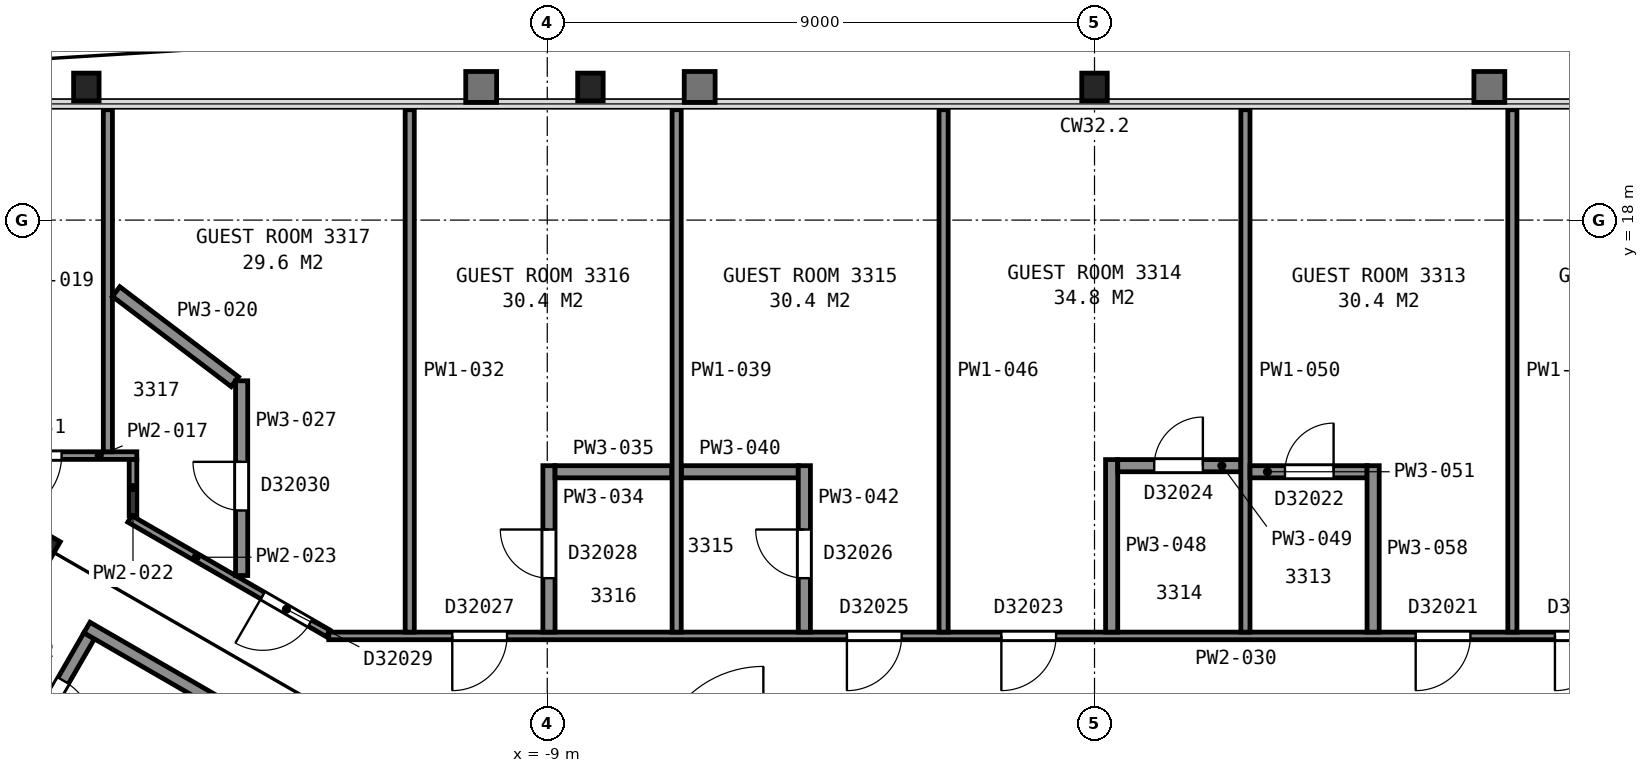
"""IFC4 building model, lengths in metres.
Left out: names, types, materials, properties, quantities, classifications, styles, units other than length and angle.
Written with IfcOpenShell. Run it as: python <this file> out.ifc"""

import sys

from ifc_helpers import new_model, si_unit, direction, frame, frame_2d, origin, origin_2d, place, context, subcontext, project, spatial, rectangle, i_section, extrude, element, fill, save


model = new_model("IFC4")
c1 = context("Model", 3, precision=1e-05, world=origin(), true_north=direction((0.0, 1.0)))
c2 = subcontext(c1, "Body", "Model", "MODEL_VIEW")
j1 = project(units=[si_unit("LENGTHUNIT", "METRE"), si_unit("PLANEANGLEUNIT", "RADIAN")], contexts=[c1])
p1 = place(None, origin())
s1 = spatial("IfcSite", under=j1, at=p1, CompositionType="ELEMENT")
p2 = place(p1, origin())
s2 = spatial("IfcBuilding", under=s1, at=p2, CompositionType="ELEMENT")
p3 = place(p2, frame((0.0, 0.0, 136.0)))
s3 = spatial("IfcBuildingStorey", under=s2, at=p3, CompositionType="ELEMENT", Elevation=136.0)
for number, where, z_axis, x_axis in (
    (1, (0.0, 20.19, 0.0), (0.0, 0.0, 1.0), (1.0, 0.0, 0.0)),
    (2, (-8.29, 20.19, 0.0), (0.0, 0.0, 1.0), (1.0, 0.0, 0.0)),
    (3, (-16.58, 20.19, 0.0), (0.0, 0.0, 1.0), (1.0, 0.0, 0.0)),
):
    element("IfcColumn", number, at=place(p3, frame(where, z_axis=z_axis, x_axis=x_axis)), inside=s3, PredefinedType="COLUMN", context=c2, shape_type="SweptSolid", body=[
        extrude(i_section(OverallWidth=0.419, OverallDepth=0.455, WebThickness=0.042, FlangeThickness=0.068, FilletRadius=0.015, at=origin_2d()), origin(), (0.0, 0.0, 1.0), 3.6),
    ])
p4 = place(p3, frame((-17.3, 12.64, 0.0), z_axis=(0.0, 0.0, 1.0), x_axis=(0.5, 0.866025403784, 0.0)))
e4 = element("IfcColumn", 4, at=p4, inside=s3, PredefinedType="COLUMN", context=c2, shape_type="SweptSolid", body=[
    extrude(i_section(OverallWidth=0.411, OverallDepth=0.434, WebThickness=0.036, FlangeThickness=0.057, FilletRadius=0.015, at=origin_2d()), origin(), (0.0, 0.0, 1.0), 3.6),
])
p5 = place(p3, frame((6.178, 5.299, 0.0), z_axis=(0.0, 0.0, 1.0), x_axis=(0.866026010844, 0.49999894854, 0.0)))
e5 = element("IfcWall", 5, at=p5, inside=s3, PredefinedType="PARTITIONING", context=c2, shape_type="SweptSolid", body=[
    extrude(rectangle(XDim=12.0, YDim=0.2, at=frame_2d((6.0, 0.0))), origin(), (0.0, 0.0, 1.0), 3.35),
])
p6 = place(p3, frame((-16.534, 11.162, 0.0), z_axis=(0.0, 0.0, 1.0), x_axis=(-0.49998411664, -0.866034573852, 0.0)))
e6 = element("IfcWall", 6, at=p6, inside=s3, PredefinedType="PARTITIONING", context=c2, shape_type="SweptSolid", body=[
    extrude(rectangle(XDim=2.8, YDim=0.2, at=frame_2d((1.4, 0.0))), origin(), (0.0, 0.0, 1.0), 3.35),
])
p7 = place(p6, frame((0.85, 0.0, 0.0)))
e7 = element("IfcOpeningElement", 7, at=p7, cuts=e6, PredefinedType="OPENING", context=c2, shape_type="SweptSolid", body=[
    extrude(rectangle(XDim=1.1, YDim=2.1, at=frame_2d((0.55, 1.05))), frame((0.0, 0.11, 0.0), z_axis=(0.0, -1.0, 0.0), x_axis=(1.0, 0.0, 0.0)), (0.0, 0.0, 1.0), 0.22),
])
p8 = place(p3, frame((-6.178, 5.299, 0.0), z_axis=(0.0, 0.0, 1.0), x_axis=(-0.866026010844, 0.49999894854, 0.0)))
e8 = element("IfcWall", 8, at=p8, inside=s3, PredefinedType="PARTITIONING", context=c2, shape_type="SweptSolid", body=[
    extrude(rectangle(XDim=12.0, YDim=0.2, at=frame_2d((6.0, 0.0))), origin(), (0.0, 0.0, 1.0), 3.35),
])
p9 = place(p3, frame((-18.85, 14.127, 0.0), z_axis=(0.0, 0.0, 1.0), x_axis=(1.0, 0.0, 0.0)))
e9 = element("IfcWall", 9, at=p9, inside=s3, PredefinedType="PARTITIONING", context=c2, shape_type="SweptSolid", body=[
    extrude(rectangle(XDim=3.099, YDim=0.125, at=frame_2d((1.55, 0.0))), origin(), (0.0, 0.0, 1.0), 2.613),
])
p10 = place(p9, frame((0.863, 0.0, 0.0)))
e10 = element("IfcOpeningElement", 10, at=p10, cuts=e9, PredefinedType="OPENING", context=c2, shape_type="SweptSolid", body=[
    extrude(rectangle(XDim=1.0, YDim=2.1, at=frame_2d((0.5, 1.05))), frame((0.0, 0.073, 0.0), z_axis=(0.0, -1.0, 0.0), x_axis=(1.0, 0.0, 0.0)), (0.0, 0.0, 1.0), 0.145),
])
p11 = place(p3, frame((-16.226, 14.189, 0.0), z_axis=(0.0, 0.0, 1.0), x_axis=(0.0, 1.0, 0.0)))
e11 = element("IfcWall", 11, at=p11, inside=s3, PredefinedType="PARTITIONING", context=c2, shape_type="SweptSolid", body=[
    extrude(rectangle(XDim=5.625, YDim=0.15, at=frame_2d((2.813, 0.0))), origin(), (0.0, 0.0, 1.0), 2.613),
])
p12 = place(p3, frame((-16.091, 16.824, 0.0), z_axis=(0.0, 0.0, 1.0), x_axis=(0.796497816393, -0.604641404869, 0.0)))
e12 = element("IfcWall", 12, at=p12, inside=s3, PredefinedType="PARTITIONING", context=c2, shape_type="SweptSolid", body=[
    extrude(rectangle(XDim=2.452, YDim=0.2, at=frame_2d((1.226, 0.0))), origin(), (0.0, 0.0, 1.0), 2.613),
])
p13 = place(p3, frame((-15.813, 13.14, 0.0), z_axis=(0.0, 0.0, 1.0), x_axis=(0.0, 1.0, 0.0)))
e13 = element("IfcWall", 13, at=p13, inside=s3, PredefinedType="PARTITIONING", context=c2, shape_type="SweptSolid", body=[
    extrude(rectangle(XDim=0.922, YDim=0.125, at=frame_2d((0.461, 0.0))), origin(), (0.0, 0.0, 1.0), 2.613),
])
p14 = place(p3, frame((-15.867, 13.086, 0.0), z_axis=(0.0, 0.0, 1.0), x_axis=(0.866113281362, -0.499847760672, 0.0)))
e14 = element("IfcWall", 14, at=p14, inside=s3, PredefinedType="PARTITIONING", context=c2, shape_type="SweptSolid", body=[
    extrude(rectangle(XDim=3.767, YDim=0.125, at=frame_2d((1.883, 0.0))), origin(), (0.0, 0.0, 1.0), 2.613),
])
p15 = place(p14, frame((2.525, 0.0, 0.0)))
e15 = element("IfcOpeningElement", 15, at=p15, cuts=e14, PredefinedType="OPENING", context=c2, shape_type="SweptSolid", body=[
    extrude(rectangle(XDim=0.9, YDim=2.1, at=frame_2d((0.45, 1.05))), frame((0.0, 0.073, 0.0), z_axis=(0.0, -1.0, 0.0), x_axis=(1.0, 0.0, 0.0)), (0.0, 0.0, 1.0), 0.145),
])
p16 = place(p3, frame((-14.026, 12.154, 0.0), z_axis=(0.0, 0.0, 1.0), x_axis=(0.0, 1.0, 0.0)))
e16 = element("IfcWall", 16, at=p16, inside=s3, PredefinedType="PARTITIONING", context=c2, shape_type="SweptSolid", body=[
    extrude(rectangle(XDim=3.203, YDim=0.2, at=frame_2d((1.602, 0.0))), origin(), (0.0, 0.0, 1.0), 2.613),
])
p17 = place(p16, frame((1.07, 0.0, 0.0)))
e17 = element("IfcOpeningElement", 17, at=p17, cuts=e16, PredefinedType="OPENING", context=c2, shape_type="SweptSolid", body=[
    extrude(rectangle(XDim=0.8, YDim=2.1, at=frame_2d((0.4, 1.05))), frame((0.0, 0.11, 0.0), z_axis=(0.0, -1.0, 0.0), x_axis=(1.0, 0.0, 0.0)), (0.0, 0.0, 1.0), 0.22),
])
p18 = place(p3, frame((-12.594, 11.161, 0.0), z_axis=(0.0, 0.0, 1.0), x_axis=(1.0, 0.0, 0.0)))
e18 = element("IfcWall", 18, at=p18, inside=s3, PredefinedType="PARTITIONING", context=c2, shape_type="SweptSolid", body=[
    extrude(rectangle(XDim=25.187, YDim=0.125, at=frame_2d((12.594, 0.0))), origin(), (0.0, 0.0, 1.0), 2.613),
])
p19 = place(p18, frame((20.166, 0.0, 0.0)))
e19 = element("IfcOpeningElement", 19, at=p19, cuts=e18, PredefinedType="OPENING", context=c2, shape_type="SweptSolid", body=[
    extrude(rectangle(XDim=0.9, YDim=2.1, at=frame_2d((0.45, 1.05))), frame((0.0, 0.073, 0.0), z_axis=(0.0, -1.0, 0.0), x_axis=(1.0, 0.0, 0.0)), (0.0, 0.0, 1.0), 0.145),
])
p20 = place(p18, frame((17.875, 0.0, 0.0)))
e20 = element("IfcOpeningElement", 20, at=p20, cuts=e18, PredefinedType="OPENING", context=c2, shape_type="SweptSolid", body=[
    extrude(rectangle(XDim=0.9, YDim=2.1, at=frame_2d((0.45, 1.05))), frame((0.0, 0.073, 0.0), z_axis=(0.0, -1.0, 0.0), x_axis=(1.0, 0.0, 0.0)), (0.0, 0.0, 1.0), 0.145),
])
p21 = place(p18, frame((11.062, 0.0, 0.0)))
e21 = element("IfcOpeningElement", 21, at=p21, cuts=e18, PredefinedType="OPENING", context=c2, shape_type="SweptSolid", body=[
    extrude(rectangle(XDim=0.9, YDim=2.1, at=frame_2d((0.45, 1.05))), frame((0.0, 0.073, 0.0), z_axis=(0.0, -1.0, 0.0), x_axis=(1.0, 0.0, 0.0)), (0.0, 0.0, 1.0), 0.145),
])
p22 = place(p18, frame((8.521, 0.0, 0.0)))
e22 = element("IfcOpeningElement", 22, at=p22, cuts=e18, PredefinedType="OPENING", context=c2, shape_type="SweptSolid", body=[
    extrude(rectangle(XDim=0.9, YDim=2.1, at=frame_2d((0.45, 1.05))), frame((0.0, 0.073, 0.0), z_axis=(0.0, -1.0, 0.0), x_axis=(1.0, 0.0, 0.0)), (0.0, 0.0, 1.0), 0.145),
])
p23 = place(p18, frame((2.031, 0.0, 0.0)))
e23 = element("IfcOpeningElement", 23, at=p23, cuts=e18, PredefinedType="OPENING", context=c2, shape_type="SweptSolid", body=[
    extrude(rectangle(XDim=0.9, YDim=2.1, at=frame_2d((0.45, 1.05))), frame((0.0, 0.073, 0.0), z_axis=(0.0, -1.0, 0.0), x_axis=(1.0, 0.0, 0.0)), (0.0, 0.0, 1.0), 0.145),
])
p24 = place(p3, frame((-11.262, 11.223, 0.0), z_axis=(0.0, 0.0, 1.0), x_axis=(0.0, 1.0, 0.0)))
e24 = element("IfcWall", 24, at=p24, inside=s3, PredefinedType="PARTITIONING", context=c2, shape_type="SweptSolid", body=[
    extrude(rectangle(XDim=8.592, YDim=0.15, at=frame_2d((4.296, 0.0))), origin(), (0.0, 0.0, 1.0), 2.613),
])
p25 = place(p3, frame((-8.972, 13.961, 0.0), z_axis=(0.0, 0.0, 1.0), x_axis=(0.0, -1.0, 0.0)))
e25 = element("IfcWall", 25, at=p25, inside=s3, PredefinedType="PARTITIONING", context=c2, shape_type="SweptSolid", body=[
    extrude(rectangle(XDim=2.738, YDim=0.2, at=frame_2d((1.369, 0.0))), origin(), (0.0, 0.0, 1.0), 2.613),
])
p26 = place(p25, frame((1.05, 0.0, 0.0)))
e26 = element("IfcOpeningElement", 26, at=p26, cuts=e25, PredefinedType="OPENING", context=c2, shape_type="SweptSolid", body=[
    extrude(rectangle(XDim=0.8, YDim=2.1, at=frame_2d((0.4, 1.05))), frame((0.0, 0.11, 0.0), z_axis=(0.0, -1.0, 0.0), x_axis=(1.0, 0.0, 0.0)), (0.0, 0.0, 1.0), 0.22),
])
p27 = place(p3, frame((-8.872, 13.861, 0.0), z_axis=(0.0, 0.0, 1.0), x_axis=(1.0, 0.0, 0.0)))
e27 = element("IfcWall", 27, at=p27, inside=s3, PredefinedType="PARTITIONING", context=c2, shape_type="SweptSolid", body=[
    extrude(rectangle(XDim=1.92, YDim=0.2, at=frame_2d((0.96, 0.0))), origin(), (0.0, 0.0, 1.0), 2.613),
])
p28 = place(p3, frame((-6.872, 11.223, 0.0), z_axis=(0.0, 0.0, 1.0), x_axis=(0.0, 1.0, 0.0)))
e28 = element("IfcWall", 28, at=p28, inside=s3, PredefinedType="PARTITIONING", context=c2, shape_type="SweptSolid", body=[
    extrude(rectangle(XDim=8.592, YDim=0.15, at=frame_2d((4.296, 0.0))), origin(), (0.0, 0.0, 1.0), 2.613),
])
p29 = place(p3, frame((-6.792, 13.861, 0.0), z_axis=(0.0, 0.0, 1.0), x_axis=(1.0, 0.0, 0.0)))
e29 = element("IfcWall", 29, at=p29, inside=s3, PredefinedType="PARTITIONING", context=c2, shape_type="SweptSolid", body=[
    extrude(rectangle(XDim=1.92, YDim=0.2, at=frame_2d((0.96, 0.0))), origin(), (0.0, 0.0, 1.0), 2.613),
])
p30 = place(p3, frame((-4.772, 11.223, 0.0), z_axis=(0.0, 0.0, 1.0), x_axis=(0.0, 1.0, 0.0)))
e30 = element("IfcWall", 30, at=p30, inside=s3, PredefinedType="PARTITIONING", context=c2, shape_type="SweptSolid", body=[
    extrude(rectangle(XDim=2.738, YDim=0.2, at=frame_2d((1.369, 0.0))), origin(), (0.0, 0.0, 1.0), 2.613),
])
p31 = place(p30, frame((0.887, 0.0, 0.0)))
e31 = element("IfcOpeningElement", 31, at=p31, cuts=e30, PredefinedType="OPENING", context=c2, shape_type="SweptSolid", body=[
    extrude(rectangle(XDim=0.8, YDim=2.1, at=frame_2d((0.4, 1.05))), frame((0.0, 0.11, 0.0), z_axis=(0.0, -1.0, 0.0), x_axis=(1.0, 0.0, 0.0)), (0.0, 0.0, 1.0), 0.22),
])
p32 = place(p3, frame((-2.482, 11.223, 0.0), z_axis=(0.0, 0.0, 1.0), x_axis=(0.0, 1.0, 0.0)))
e32 = element("IfcWall", 32, at=p32, inside=s3, PredefinedType="PARTITIONING", context=c2, shape_type="SweptSolid", body=[
    extrude(rectangle(XDim=8.592, YDim=0.15, at=frame_2d((4.296, 0.0))), origin(), (0.0, 0.0, 1.0), 2.613),
])
p33 = place(p3, frame((0.282, 11.223, 0.0), z_axis=(0.0, 0.0, 1.0), x_axis=(0.0, 1.0, 0.0)))
e33 = element("IfcWall", 33, at=p33, inside=s3, PredefinedType="PARTITIONING", context=c2, shape_type="SweptSolid", body=[
    extrude(rectangle(XDim=2.838, YDim=0.2, at=frame_2d((1.419, 0.0))), origin(), (0.0, 0.0, 1.0), 2.613),
])
p34 = place(p3, frame((2.407, 13.961, 0.0), z_axis=(0.0, 0.0, 1.0), x_axis=(-1.0, 0.0, 0.0)))
e34 = element("IfcWall", 34, at=p34, inside=s3, PredefinedType="PARTITIONING", context=c2, shape_type="SweptSolid", body=[
    extrude(rectangle(XDim=2.025, YDim=0.2, at=frame_2d((1.012, 0.0))), origin(), (0.0, 0.0, 1.0), 2.613),
])
p35 = place(p34, frame((0.625, 0.0, 0.0)))
e35 = element("IfcOpeningElement", 35, at=p35, cuts=e34, PredefinedType="OPENING", context=c2, shape_type="SweptSolid", body=[
    extrude(rectangle(XDim=0.8, YDim=2.1, at=frame_2d((0.4, 1.05))), frame((0.0, 0.11, 0.0), z_axis=(0.0, -1.0, 0.0), x_axis=(1.0, 0.0, 0.0)), (0.0, 0.0, 1.0), 0.22),
])
p36 = place(p3, frame((2.482, 11.223, 0.0), z_axis=(0.0, 0.0, 1.0), x_axis=(0.0, 1.0, 0.0)))
e36 = element("IfcWall", 36, at=p36, inside=s3, PredefinedType="PARTITIONING", context=c2, shape_type="SweptSolid", body=[
    extrude(rectangle(XDim=8.592, YDim=0.15, at=frame_2d((4.296, 0.0))), origin(), (0.0, 0.0, 1.0), 2.613),
])
p37 = place(p3, frame((4.482, 13.861, 0.0), z_axis=(0.0, 0.0, 1.0), x_axis=(-1.0, 0.0, 0.0)))
e37 = element("IfcWall", 37, at=p37, inside=s3, PredefinedType="PARTITIONING", context=c2, shape_type="SweptSolid", body=[
    extrude(rectangle(XDim=1.925, YDim=0.2, at=frame_2d((0.962, 0.0))), origin(), (0.0, 0.0, 1.0), 2.613),
])
p38 = place(p37, frame((0.55, 0.0, 0.0)))
e38 = element("IfcOpeningElement", 38, at=p38, cuts=e37, PredefinedType="OPENING", context=c2, shape_type="SweptSolid", body=[
    extrude(rectangle(XDim=0.8, YDim=2.1, at=frame_2d((0.4, 1.05))), frame((0.0, 0.11, 0.0), z_axis=(0.0, -1.0, 0.0), x_axis=(1.0, 0.0, 0.0)), (0.0, 0.0, 1.0), 0.22),
])
p39 = place(p3, frame((4.582, 11.223, 0.0), z_axis=(0.0, 0.0, 1.0), x_axis=(0.0, 1.0, 0.0)))
e39 = element("IfcWall", 39, at=p39, inside=s3, PredefinedType="PARTITIONING", context=c2, shape_type="SweptSolid", body=[
    extrude(rectangle(XDim=2.738, YDim=0.2, at=frame_2d((1.369, 0.0))), origin(), (0.0, 0.0, 1.0), 2.613),
])
p40 = place(p3, frame((6.872, 11.223, 0.0), z_axis=(0.0, 0.0, 1.0), x_axis=(0.0, 1.0, 0.0)))
e40 = element("IfcWall", 40, at=p40, inside=s3, PredefinedType="PARTITIONING", context=c2, shape_type="SweptSolid", body=[
    extrude(rectangle(XDim=8.592, YDim=0.15, at=frame_2d((4.296, 0.0))), origin(), (0.0, 0.0, 1.0), 2.613),
])
p41 = place(p7, origin())
e41 = element("IfcDoor", 41, at=p41, inside=s3, OperationType="SINGLE_SWING_RIGHT", PredefinedType="DOOR", context=c2, shape_type="SweptSolid", body=[
    extrude(rectangle(XDim=1.1, YDim=2.1, at=frame_2d((0.55, 1.05))), frame((0.0, 0.025, 0.0), z_axis=(0.0, -1.0, 0.0), x_axis=(1.0, 0.0, 0.0)), (0.0, 0.0, 1.0), 0.05),
])
fill(e7, e41)
p42 = place(p10, origin())
e42 = element("IfcDoor", 42, at=p42, inside=s3, OperationType="SINGLE_SWING_LEFT", PredefinedType="DOOR", context=c2, shape_type="SweptSolid", body=[
    extrude(rectangle(XDim=1.0, YDim=2.1, at=frame_2d((0.5, 1.05))), frame((0.0, 0.025, 0.0), z_axis=(0.0, -1.0, 0.0), x_axis=(1.0, 0.0, 0.0)), (0.0, 0.0, 1.0), 0.05),
])
fill(e10, e42)
p43 = place(p15, origin())
e43 = element("IfcDoor", 43, at=p43, inside=s3, OperationType="SINGLE_SWING_LEFT", PredefinedType="DOOR", context=c2, shape_type="SweptSolid", body=[
    extrude(rectangle(XDim=0.9, YDim=2.1, at=frame_2d((0.45, 1.05))), frame((0.0, 0.025, 0.0), z_axis=(0.0, -1.0, 0.0), x_axis=(1.0, 0.0, 0.0)), (0.0, 0.0, 1.0), 0.05),
])
fill(e15, e43)
p44 = place(p17, origin())
e44 = element("IfcDoor", 44, at=p44, inside=s3, OperationType="SINGLE_SWING_RIGHT", PredefinedType="DOOR", context=c2, shape_type="SweptSolid", body=[
    extrude(rectangle(XDim=0.8, YDim=2.1, at=frame_2d((0.4, 1.05))), frame((0.0, 0.025, 0.0), z_axis=(0.0, -1.0, 0.0), x_axis=(1.0, 0.0, 0.0)), (0.0, 0.0, 1.0), 0.05),
])
fill(e17, e44)
p45 = place(p19, origin())
e45 = element("IfcDoor", 45, at=p45, inside=s3, OperationType="SINGLE_SWING_LEFT", PredefinedType="DOOR", context=c2, shape_type="SweptSolid", body=[
    extrude(rectangle(XDim=0.9, YDim=2.1, at=frame_2d((0.45, 1.05))), frame((0.0, 0.025, 0.0), z_axis=(0.0, -1.0, 0.0), x_axis=(1.0, 0.0, 0.0)), (0.0, 0.0, 1.0), 0.05),
])
fill(e19, e45)
p46 = place(p20, origin())
e46 = element("IfcDoor", 46, at=p46, inside=s3, OperationType="SINGLE_SWING_LEFT", PredefinedType="DOOR", context=c2, shape_type="SweptSolid", body=[
    extrude(rectangle(XDim=0.9, YDim=2.1, at=frame_2d((0.45, 1.05))), frame((0.0, 0.025, 0.0), z_axis=(0.0, -1.0, 0.0), x_axis=(1.0, 0.0, 0.0)), (0.0, 0.0, 1.0), 0.05),
])
fill(e20, e46)
p47 = place(p21, origin())
e47 = element("IfcDoor", 47, at=p47, inside=s3, OperationType="SINGLE_SWING_LEFT", PredefinedType="DOOR", context=c2, shape_type="SweptSolid", body=[
    extrude(rectangle(XDim=0.9, YDim=2.1, at=frame_2d((0.45, 1.05))), frame((0.0, 0.025, 0.0), z_axis=(0.0, -1.0, 0.0), x_axis=(1.0, 0.0, 0.0)), (0.0, 0.0, 1.0), 0.05),
])
fill(e21, e47)
p48 = place(p22, origin())
e48 = element("IfcDoor", 48, at=p48, inside=s3, OperationType="SINGLE_SWING_LEFT", PredefinedType="DOOR", context=c2, shape_type="SweptSolid", body=[
    extrude(rectangle(XDim=0.9, YDim=2.1, at=frame_2d((0.45, 1.05))), frame((0.0, 0.025, 0.0), z_axis=(0.0, -1.0, 0.0), x_axis=(1.0, 0.0, 0.0)), (0.0, 0.0, 1.0), 0.05),
])
fill(e22, e48)
p49 = place(p23, origin())
e49 = element("IfcDoor", 49, at=p49, inside=s3, OperationType="SINGLE_SWING_LEFT", PredefinedType="DOOR", context=c2, shape_type="SweptSolid", body=[
    extrude(rectangle(XDim=0.9, YDim=2.1, at=frame_2d((0.45, 1.05))), frame((0.0, 0.025, 0.0), z_axis=(0.0, -1.0, 0.0), x_axis=(1.0, 0.0, 0.0)), (0.0, 0.0, 1.0), 0.05),
])
fill(e23, e49)
p50 = place(p26, origin())
e50 = element("IfcDoor", 50, at=p50, inside=s3, OperationType="SINGLE_SWING_LEFT", PredefinedType="DOOR", context=c2, shape_type="SweptSolid", body=[
    extrude(rectangle(XDim=0.8, YDim=2.1, at=frame_2d((0.4, 1.05))), frame((0.0, 0.025, 0.0), z_axis=(0.0, -1.0, 0.0), x_axis=(1.0, 0.0, 0.0)), (0.0, 0.0, 1.0), 0.05),
])
fill(e26, e50)
p51 = place(p31, origin())
e51 = element("IfcDoor", 51, at=p51, inside=s3, OperationType="SINGLE_SWING_RIGHT", PredefinedType="DOOR", context=c2, shape_type="SweptSolid", body=[
    extrude(rectangle(XDim=0.8, YDim=2.1, at=frame_2d((0.4, 1.05))), frame((0.0, 0.025, 0.0), z_axis=(0.0, -1.0, 0.0), x_axis=(1.0, 0.0, 0.0)), (0.0, 0.0, 1.0), 0.05),
])
fill(e31, e51)
p52 = place(p35, origin())
e52 = element("IfcDoor", 52, at=p52, inside=s3, OperationType="SINGLE_SWING_LEFT", PredefinedType="DOOR", context=c2, shape_type="SweptSolid", body=[
    extrude(rectangle(XDim=0.8, YDim=2.1, at=frame_2d((0.4, 1.05))), frame((0.0, 0.025, 0.0), z_axis=(0.0, -1.0, 0.0), x_axis=(1.0, 0.0, 0.0)), (0.0, 0.0, 1.0), 0.05),
])
fill(e35, e52)
p53 = place(p38, origin())
e53 = element("IfcDoor", 53, at=p53, inside=s3, OperationType="SINGLE_SWING_LEFT", PredefinedType="DOOR", context=c2, shape_type="SweptSolid", body=[
    extrude(rectangle(XDim=0.8, YDim=2.1, at=frame_2d((0.4, 1.05))), frame((0.0, 0.025, 0.0), z_axis=(0.0, -1.0, 0.0), x_axis=(1.0, 0.0, 0.0)), (0.0, 0.0, 1.0), 0.05),
])
fill(e38, e53)
save(model, sys.argv[1])
